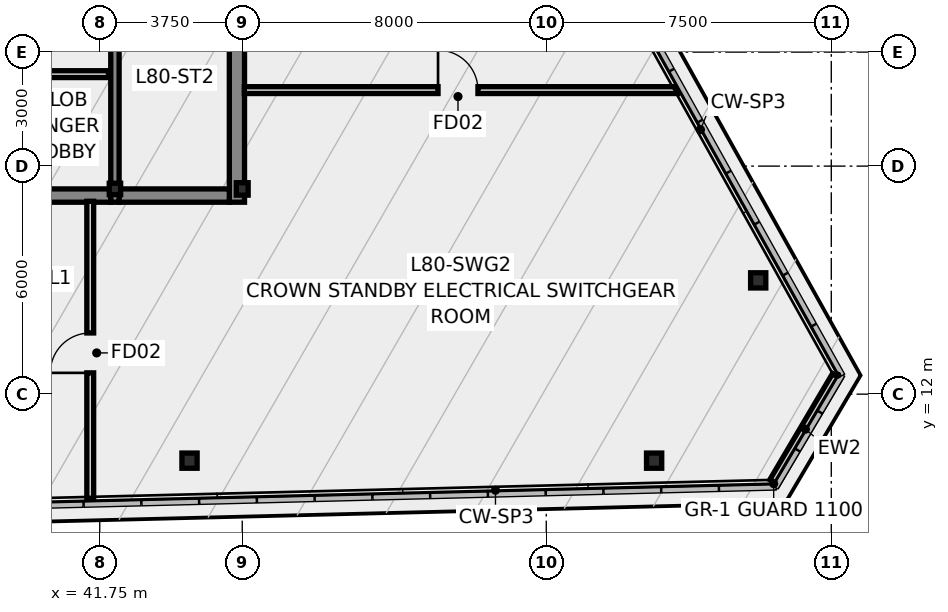
"""IFC4 building model, lengths in metres.
Left out: names, types, materials, properties, quantities, classifications, styles, units other than length and angle.
Written with IfcOpenShell. Run it as: python <this file> out.ifc"""

import sys

from ifc_helpers import new_model, si_unit, direction, frame, frame_2d, origin, origin_2d, place, context, subcontext, project, spatial, rectangle, hollow_rectangle, i_section, extrude, source, transform, mapped, element, fill, save


model = new_model("IFC4")
c1 = context("Model", 3, precision=1e-05, world=origin(), true_north=direction((0.0, 1.0)))
c2 = subcontext(c1, "Body", "Model", "MODEL_VIEW")
j1 = project(units=[si_unit("LENGTHUNIT", "METRE"), si_unit("PLANEANGLEUNIT", "RADIAN")], contexts=[c1])
p1 = place(None, origin())
s1 = spatial("IfcSite", under=j1, at=p1, CompositionType="ELEMENT")
p2 = place(p1, origin())
s2 = spatial("IfcBuilding", under=s1, at=p2, CompositionType="ELEMENT")
p3 = place(p2, frame((0.0, 0.0, 303.4)))
s3 = spatial("IfcBuildingStorey", under=s2, at=p3, CompositionType="ELEMENT", Elevation=303.4)
m1 = source(origin(), c2, "Body", "SweptSolid", [
    extrude(i_section(OverallWidth=0.311, OverallDepth=0.327, WebThickness=0.016, FlangeThickness=0.025, at=origin_2d()), origin(), (0.0, 0.0, 1.0), 8.567),
])
p4 = place(p3, frame((45.5, 17.4, 0.0), z_axis=(0.0, 0.0, 1.0), x_axis=(1.0, 0.0, 0.0)))
e1 = element("IfcColumn", 1, at=p4, inside=s3, PredefinedType="COLUMN", context=c2, shape_type="MappedRepresentation", body=[
    mapped(m1, transform((0.0, 0.0, 0.0), scale=1.0)),
])
m2 = source(origin(), c2, "Body", "SweptSolid", [
    extrude(hollow_rectangle(XDim=0.3, YDim=0.3, WallThickness=0.012, at=origin_2d()), origin(), (0.0, 0.0, 1.0), 8.207),
])
p5 = place(p3, frame((42.15, 17.4, 0.0), z_axis=(0.0, 0.0, 1.0), x_axis=(1.0, 0.0, 0.0)))
e2 = element("IfcColumn", 2, at=p5, inside=s3, PredefinedType="COLUMN", context=c2, shape_type="MappedRepresentation", body=[
    mapped(m2, transform((0.0, 0.0, 0.0), scale=1.0)),
])
p6 = place(p3, frame((45.36, 17.05, 0.0), z_axis=(0.0, 0.0, 1.0), x_axis=(0.0, 1.0, 0.0)))
e3 = element("IfcWall", 3, at=p6, inside=s3, PredefinedType="SHEAR", context=c2, shape_type="SweptSolid", body=[
    extrude(rectangle(XDim=13.125, YDim=0.4, at=frame_2d((6.562, 0.0))), origin(), (0.0, 0.0, 1.0), 6.87),
])
p7 = place(p6, frame((6.3, 0.0, 0.0)))
e4 = element("IfcOpeningElement", 4, at=p7, cuts=e3, PredefinedType="OPENING", context=c2, shape_type="SweptSolid", body=[
    extrude(rectangle(XDim=1.12, YDim=2.15, at=frame_2d((0.56, 1.075))), frame((0.0, 0.212, 0.0), z_axis=(0.0, -1.0, 0.0), x_axis=(1.0, 0.0, 0.0)), (0.0, 0.0, 1.0), 0.424),
])
p8 = place(p6, frame((10.75, 0.0, 0.0)))
e5 = element("IfcOpeningElement", 5, at=p8, cuts=e3, PredefinedType="OPENING", context=c2, shape_type="SweptSolid", body=[
    extrude(rectangle(XDim=1.2, YDim=2.2, at=frame_2d((0.6, 1.1))), frame((0.0, 0.212, 0.0), z_axis=(0.0, -1.0, 0.0), x_axis=(1.0, 0.0, 0.0)), (0.0, 0.0, 1.0), 0.424),
])
p9 = place(p3, frame((33.96, 17.225, 0.0), z_axis=(0.0, 0.0, 1.0), x_axis=(1.0, 0.0, 0.0)))
e6 = element("IfcWall", 6, at=p9, inside=s3, PredefinedType="SHEAR", context=c2, shape_type="SweptSolid", body=[
    extrude(rectangle(XDim=8.08, YDim=0.35, at=frame_2d((4.04, 0.0))), origin(), (0.0, 0.0, 1.0), 6.87),
])
p10 = place(p3, frame((42.26, 17.225, 0.0), z_axis=(0.0, 0.0, 1.0), x_axis=(1.0, 0.0, 0.0)))
e7 = element("IfcWall", 7, at=p10, inside=s3, PredefinedType="SHEAR", context=c2, shape_type="SweptSolid", body=[
    extrude(rectangle(XDim=2.9, YDim=0.35, at=frame_2d((1.45, 0.0))), origin(), (0.0, 0.0, 1.0), 6.87),
])
p11 = place(p3, frame((42.15, 17.05, 0.0), z_axis=(0.0, 0.0, 1.0), x_axis=(0.0, 1.0, 0.0)))
e8 = element("IfcWall", 8, at=p11, inside=s3, PredefinedType="SHEAR", context=c2, shape_type="SweptSolid", body=[
    extrude(rectangle(XDim=13.125, YDim=0.22, at=frame_2d((6.562, 0.0))), origin(), (0.0, 0.0, 1.0), 6.87),
])
m3 = source(origin(), c2, "Body", "SweptSolid", [
    extrude(hollow_rectangle(XDim=0.4, YDim=0.4, WallThickness=0.016, at=origin_2d()), origin(), (0.0, 0.0, 1.0), 7.087),
])
p12 = place(p3, frame((44.113, 10.25, 0.0), z_axis=(0.0, 0.0, 1.0), x_axis=(1.0, 0.0, 0.0)))
e9 = element("IfcColumn", 9, at=p12, inside=s3, PredefinedType="COLUMN", context=c2, shape_type="MappedRepresentation", body=[
    mapped(m3, transform((0.0, 0.0, 0.0), scale=1.0)),
])
m4 = source(origin(), c2, "Body", "SweptSolid", [
    extrude(hollow_rectangle(XDim=0.4, YDim=0.4, WallThickness=0.016, at=origin_2d()), origin(), (0.0, 0.0, 1.0), 8.401),
])
p13 = place(p3, frame((56.338, 10.25, 0.0), z_axis=(0.0, 0.0, 1.0), x_axis=(1.0, 0.0, 0.0)))
e10 = element("IfcColumn", 10, at=p13, inside=s3, PredefinedType="COLUMN", context=c2, shape_type="MappedRepresentation", body=[
    mapped(m4, transform((0.0, 0.0, 0.0), scale=1.0)),
])
m5 = source(origin(), c2, "Body", "SweptSolid", [
    extrude(hollow_rectangle(XDim=0.4, YDim=0.4, WallThickness=0.016, at=origin_2d()), origin(), (0.0, 0.0, 1.0), 9.579),
])
p14 = place(p3, frame((59.077, 14.994, 0.0), z_axis=(0.0, 0.0, 1.0), x_axis=(1.0, 0.0, 0.0)))
e11 = element("IfcColumn", 11, at=p14, inside=s3, PredefinedType="COLUMN", context=c2, shape_type="MappedRepresentation", body=[
    mapped(m5, transform((0.0, 0.0, 0.0), scale=1.0)),
])
p15 = place(p3, frame((61.145, 12.475, 0.0), z_axis=(0.0, 0.0, 1.0), x_axis=(-0.508787597766, -0.860892084038, 0.0)))
e12 = element("IfcWall", 12, at=p15, inside=s3, PredefinedType="STANDARD", context=c2, shape_type="SweptSolid", body=[
    extrude(rectangle(XDim=3.246, YDim=0.26, at=frame_2d((1.623, 0.0))), origin(), (0.0, 0.0, 1.0), 3.4),
])
p16 = place(p3, frame((40.22, 20.42, 0.0), z_axis=(0.0, 0.0, 1.0), x_axis=(1.0, 0.0, 0.0)))
e13 = element("IfcWall", 13, at=p16, inside=s3, PredefinedType="PARTITIONING", context=c2, shape_type="SweptSolid", body=[
    extrude(rectangle(XDim=1.76, YDim=0.18, at=frame_2d((0.88, 0.0))), origin(), (0.0, 0.0, 1.0), 3.15),
])
p17 = place(p3, frame((45.555, 20.0, 0.0), z_axis=(0.0, 0.0, 1.0), x_axis=(1.0, 0.0, 0.0)))
e14 = element("IfcWall", 14, at=p17, inside=s3, PredefinedType="PARTITIONING", context=c2, shape_type="SweptSolid", body=[
    extrude(rectangle(XDim=11.401, YDim=0.18, at=frame_2d((5.7, 0.0))), origin(), (0.0, 0.0, 1.0), 3.15),
])
p18 = place(p17, frame((5.097, 0.0, 0.0)))
e15 = element("IfcOpeningElement", 15, at=p18, cuts=e14, PredefinedType="OPENING", context=c2, shape_type="SweptSolid", body=[
    extrude(rectangle(XDim=1.05, YDim=2.15, at=frame_2d((0.525, 1.075))), frame((0.0, 0.102, 0.0), z_axis=(0.0, -1.0, 0.0), x_axis=(1.0, 0.0, 0.0)), (0.0, 0.0, 1.0), 0.204),
])
p19 = place(p3, frame((41.5, 9.227, 0.0), z_axis=(0.0, 0.0, 1.0), x_axis=(0.0, 1.0, 0.0)))
e16 = element("IfcWall", 16, at=p19, inside=s3, PredefinedType="PARTITIONING", context=c2, shape_type="SweptSolid", body=[
    extrude(rectangle(XDim=7.848, YDim=0.18, at=frame_2d((3.924, 0.0))), origin(), (0.0, 0.0, 1.0), 3.15),
])
p20 = place(p19, frame((3.333, 0.0, 0.0)))
e17 = element("IfcOpeningElement", 17, at=p20, cuts=e16, PredefinedType="OPENING", context=c2, shape_type="SweptSolid", body=[
    extrude(rectangle(XDim=1.05, YDim=2.15, at=frame_2d((0.525, 1.075))), frame((0.0, 0.102, 0.0), z_axis=(0.0, -1.0, 0.0), x_axis=(1.0, 0.0, 0.0)), (0.0, 0.0, 1.0), 0.204),
])
p21 = place(p18, origin())
e18 = element("IfcDoor", 18, at=p21, inside=s3, OperationType="SINGLE_SWING_LEFT", PredefinedType="DOOR", context=c2, shape_type="SweptSolid", body=[
    extrude(rectangle(XDim=1.05, YDim=2.15, at=frame_2d((0.525, 1.075))), frame((0.0, 0.025, 0.0), z_axis=(0.0, -1.0, 0.0), x_axis=(1.0, 0.0, 0.0)), (0.0, 0.0, 1.0), 0.05),
])
fill(e15, e18)
p22 = place(p20, origin())
e19 = element("IfcDoor", 19, at=p22, inside=s3, OperationType="SINGLE_SWING_LEFT", PredefinedType="DOOR", context=c2, shape_type="SweptSolid", body=[
    extrude(rectangle(XDim=1.05, YDim=2.15, at=frame_2d((0.525, 1.075))), frame((0.0, 0.025, 0.0), z_axis=(0.0, -1.0, 0.0), x_axis=(1.0, 0.0, 0.0)), (0.0, 0.0, 1.0), 0.05),
])
fill(e17, e19)
save(model, sys.argv[1])
